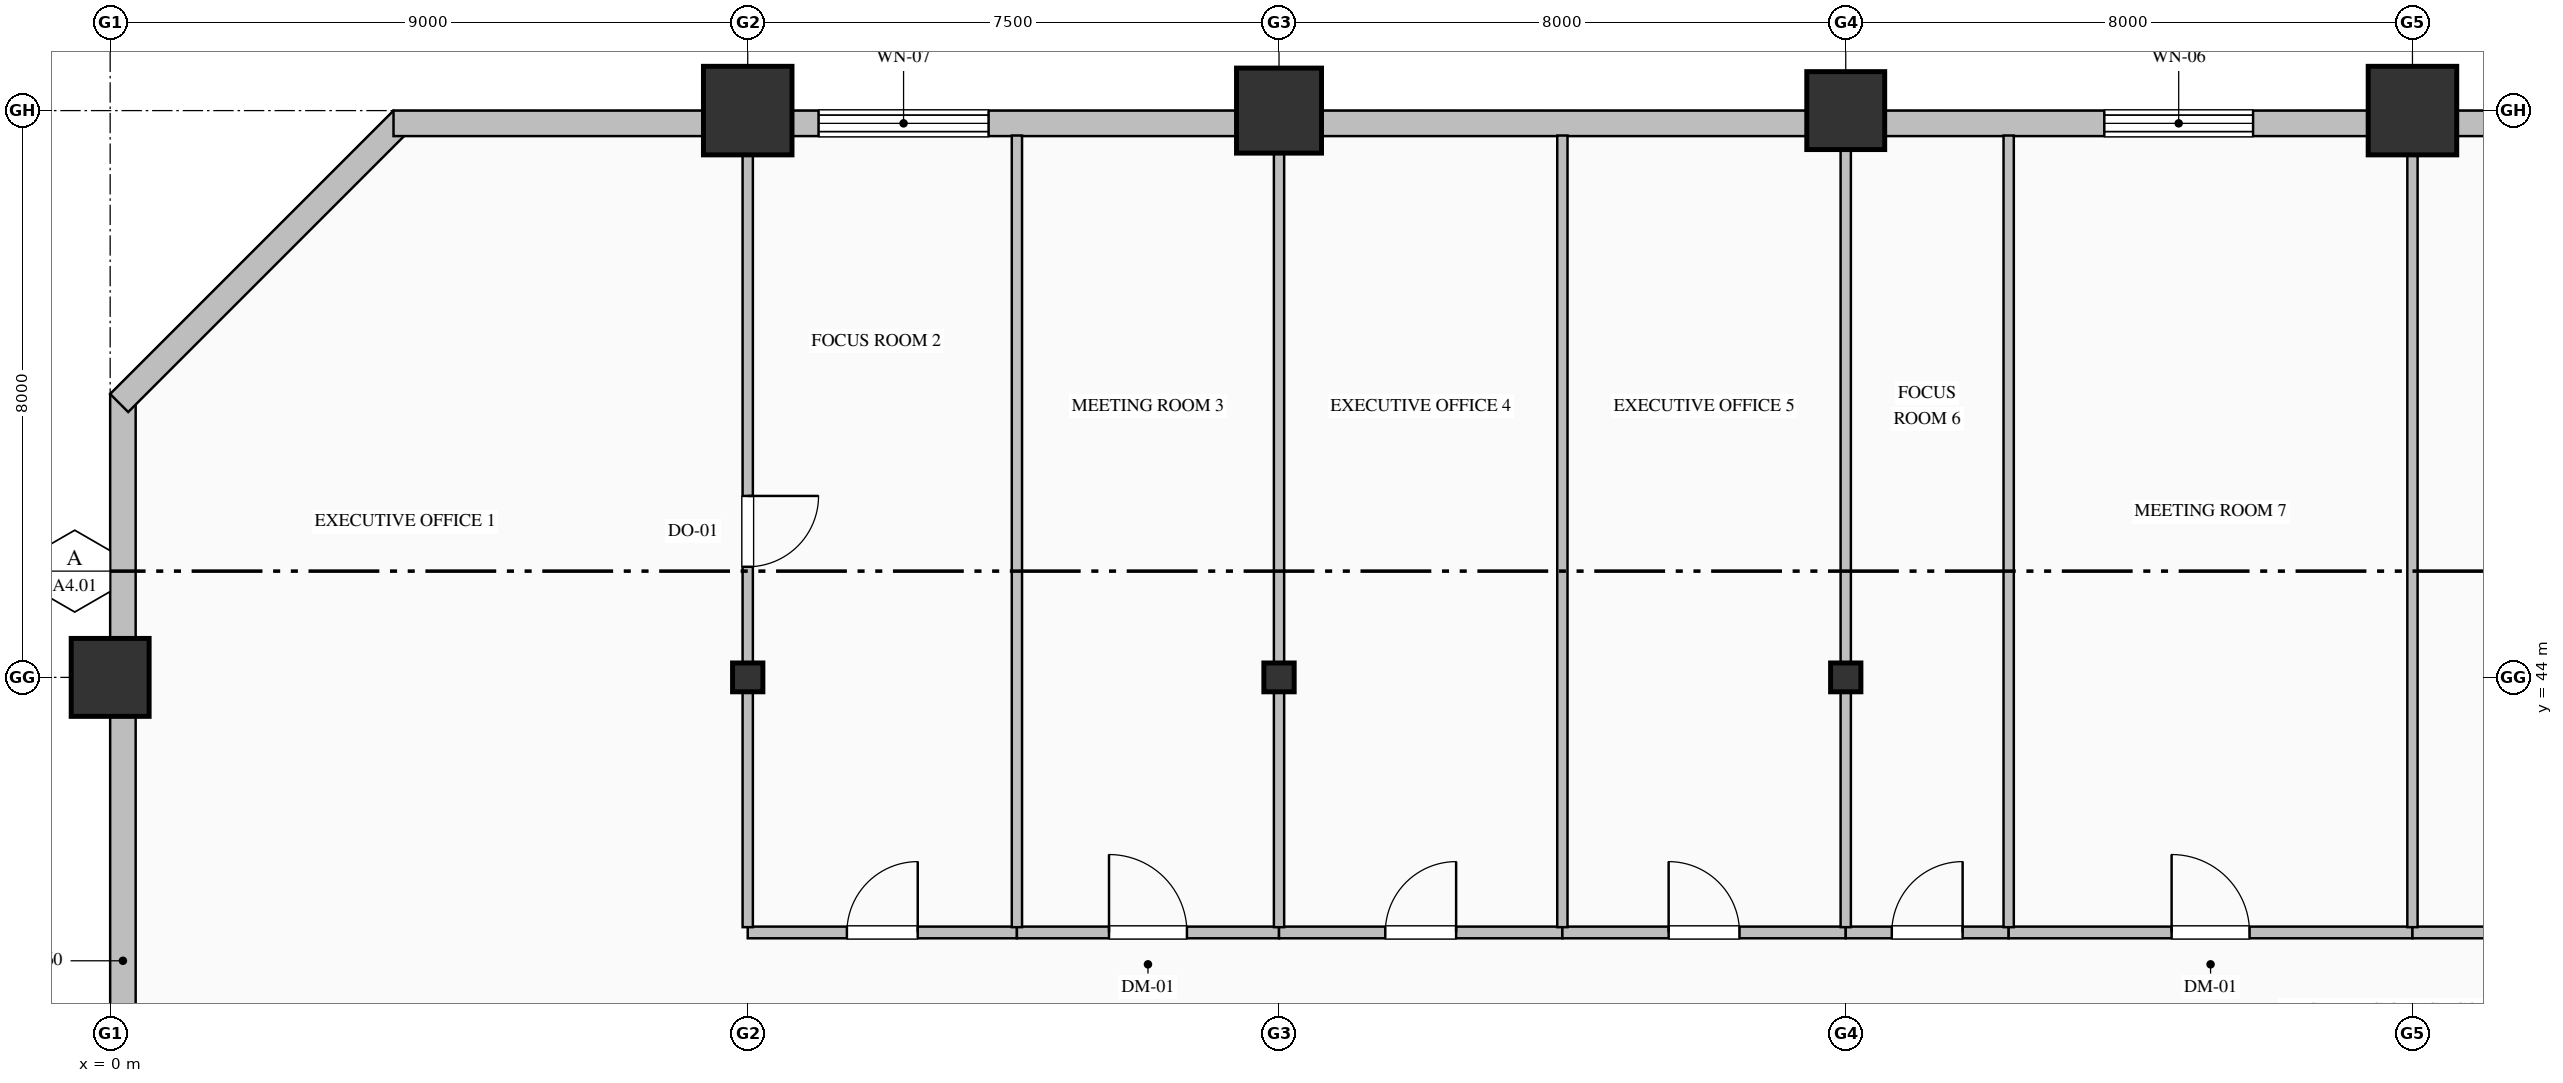
"""IFC4 building model, lengths in metres.
Left out: names, types, materials, properties, quantities, classifications, styles, units other than length and angle.
Written with IfcOpenShell. Run it as: python <this file> out.ifc"""

import sys

from ifc_helpers import new_model, si_unit, direction, frame, frame_2d, origin, origin_2d, place, context, subcontext, project, spatial, rectangle, hollow_rectangle, hollow_circle, i_section, extrude, element, fill, save


model = new_model("IFC4")
c1 = context("Model", 3, precision=1e-05, world=origin(), true_north=direction((0.0, 1.0)))
c2 = subcontext(c1, "Body", "Model", "MODEL_VIEW")
j1 = project(units=[si_unit("LENGTHUNIT", "METRE"), si_unit("PLANEANGLEUNIT", "RADIAN")], contexts=[c1])
p1 = place(None, origin())
s1 = spatial("IfcSite", under=j1, at=p1, CompositionType="ELEMENT")
p2 = place(p1, origin())
s2 = spatial("IfcBuilding", under=s1, at=p2, CompositionType="ELEMENT")
p3 = place(p2, frame((0.0, 0.0, 36.2)))
s3 = spatial("IfcBuildingStorey", under=s2, at=p3, CompositionType="ELEMENT", Elevation=36.2)
p4 = place(p3, frame((0.0, 44.0, 0.0), z_axis=(0.0, 0.0, 1.0), x_axis=(1.0, 0.0, 0.0)))
e1 = element("IfcColumn", 1, at=p4, inside=s3, PredefinedType="COLUMN", context=c2, shape_type="SweptSolid", body=[
    extrude(hollow_rectangle(XDim=1.1, YDim=1.1, WallThickness=0.04, at=origin_2d()), origin(), (0.0, 0.0, 1.0), 4.0),
])
p5 = place(p3, frame((9.0, 44.0, 0.0), z_axis=(0.0, 0.0, 1.0), x_axis=(1.0, 0.0, 0.0)))
e2 = element("IfcColumn", 2, at=p5, inside=s3, PredefinedType="COLUMN", context=c2, shape_type="SweptSolid", body=[
    extrude(i_section(OverallWidth=0.407, OverallDepth=0.428, WebThickness=0.02, FlangeThickness=0.035, FilletRadius=0.022, at=origin_2d()), origin(), (0.0, 0.0, 1.0), 4.0),
])
p6 = place(p3, frame((9.0, 52.0, 0.0), z_axis=(0.0, 0.0, 1.0), x_axis=(1.0, 0.0, 0.0)))
e3 = element("IfcColumn", 3, at=p6, inside=s3, PredefinedType="COLUMN", context=c2, shape_type="SweptSolid", body=[
    extrude(hollow_rectangle(XDim=1.25, YDim=1.25, WallThickness=0.045, at=origin_2d()), origin(), (0.0, 0.0, 1.0), 4.0),
])
p7 = place(p3, frame((16.5, 44.0, 0.0), z_axis=(0.0, 0.0, 1.0), x_axis=(1.0, 0.0, 0.0)))
e4 = element("IfcColumn", 4, at=p7, inside=s3, PredefinedType="COLUMN", context=c2, shape_type="SweptSolid", body=[
    extrude(i_section(OverallWidth=0.407, OverallDepth=0.428, WebThickness=0.02, FlangeThickness=0.035, FilletRadius=0.022, at=origin_2d()), origin(), (0.0, 0.0, 1.0), 4.0),
])
p8 = place(p3, frame((16.5, 52.0, 0.0), z_axis=(0.0, 0.0, 1.0), x_axis=(1.0, 0.0, 0.0)))
e5 = element("IfcColumn", 5, at=p8, inside=s3, PredefinedType="COLUMN", context=c2, shape_type="SweptSolid", body=[
    extrude(hollow_circle(Radius=0.6, WallThickness=0.04, at=origin_2d()), origin(), (0.0, 0.0, 1.0), 4.0),
])
p9 = place(p3, frame((24.5, 44.0, 0.0), z_axis=(0.0, 0.0, 1.0), x_axis=(1.0, 0.0, 0.0)))
e6 = element("IfcColumn", 6, at=p9, inside=s3, PredefinedType="COLUMN", context=c2, shape_type="SweptSolid", body=[
    extrude(i_section(OverallWidth=0.407, OverallDepth=0.428, WebThickness=0.02, FlangeThickness=0.035, FilletRadius=0.022, at=origin_2d()), origin(), (0.0, 0.0, 1.0), 4.0),
])
p10 = place(p3, frame((24.5, 52.0, 0.0), z_axis=(0.0, 0.0, 1.0), x_axis=(1.0, 0.0, 0.0)))
e7 = element("IfcColumn", 7, at=p10, inside=s3, PredefinedType="COLUMN", context=c2, shape_type="SweptSolid", body=[
    extrude(hollow_rectangle(XDim=1.1, YDim=1.1, WallThickness=0.04, at=origin_2d()), origin(), (0.0, 0.0, 1.0), 4.0),
])
p11 = place(p3, frame((32.5, 52.0, 0.0), z_axis=(0.0, 0.0, 1.0), x_axis=(1.0, 0.0, 0.0)))
e8 = element("IfcColumn", 8, at=p11, inside=s3, PredefinedType="COLUMN", context=c2, shape_type="SweptSolid", body=[
    extrude(hollow_rectangle(XDim=1.25, YDim=1.25, WallThickness=0.045, at=origin_2d()), origin(), (0.0, 0.0, 1.0), 4.0),
])
p12 = place(p3, frame((0.18, 32.0, 0.0), z_axis=(0.0, 0.0, 1.0), x_axis=(0.0, 1.0, 0.0)))
e9 = element("IfcWall", 9, at=p12, inside=s3, PredefinedType="SOLIDWALL", context=c2, shape_type="SweptSolid", body=[
    extrude(rectangle(XDim=16.0, YDim=0.36, at=frame_2d((8.0, 0.0))), origin(), (0.0, 0.0, 1.0), 3.25),
])
p13 = place(p3, frame((0.127, 47.873, 0.0), z_axis=(0.0, 0.0, 1.0), x_axis=(0.707106781187, 0.707106781187, 0.0)))
e10 = element("IfcWall", 10, at=p13, inside=s3, PredefinedType="SOLIDWALL", context=c2, shape_type="SweptSolid", body=[
    extrude(rectangle(XDim=5.657, YDim=0.36, at=frame_2d((2.828, 0.0))), origin(), (0.0, 0.0, 1.0), 3.75),
])
p14 = place(p3, frame((4.0, 51.82, 0.0), z_axis=(0.0, 0.0, 1.0), x_axis=(1.0, 0.0, 0.0)))
e11 = element("IfcWall", 11, at=p14, inside=s3, PredefinedType="SOLIDWALL", context=c2, shape_type="SweptSolid", body=[
    extrude(rectangle(XDim=36.52, YDim=0.36, at=frame_2d((18.26, 0.0))), origin(), (0.0, 0.0, 1.0), 3.25),
])
p15 = place(p14, frame((6.0, 0.0, 0.8)))
e12 = element("IfcOpeningElement", 12, at=p15, cuts=e11, PredefinedType="OPENING", context=c2, shape_type="SweptSolid", body=[
    extrude(rectangle(XDim=2.4, YDim=2.15, at=frame_2d((1.2, 1.075))), frame((0.0, 0.19, 0.0), z_axis=(0.0, -1.0, 0.0), x_axis=(1.0, 0.0, 0.0)), (0.0, 0.0, 1.0), 0.38),
])
p16 = place(p14, frame((24.15, 0.0, 0.85)))
e13 = element("IfcOpeningElement", 13, at=p16, cuts=e11, PredefinedType="OPENING", context=c2, shape_type="SweptSolid", body=[
    extrude(rectangle(XDim=2.1, YDim=2.05, at=frame_2d((1.05, 1.025))), frame((0.0, 0.19, 0.0), z_axis=(0.0, -1.0, 0.0), x_axis=(1.0, 0.0, 0.0)), (0.0, 0.0, 1.0), 0.38),
])
p17 = place(p3, frame((9.0, 40.4, 0.0), z_axis=(0.0, 0.0, 1.0), x_axis=(1.0, 0.0, 0.0)))
e14 = element("IfcWall", 14, at=p17, inside=s3, PredefinedType="PARTITIONING", context=c2, shape_type="SweptSolid", body=[
    extrude(rectangle(XDim=3.8, YDim=0.165, at=frame_2d((1.9, 0.0))), origin(), (0.0, 0.0, 1.0), 3.75),
])
p18 = place(p17, frame((1.4, 0.0, 0.0)))
e15 = element("IfcOpeningElement", 15, at=p18, cuts=e14, PredefinedType="OPENING", context=c2, shape_type="SweptSolid", body=[
    extrude(rectangle(XDim=1.0, YDim=2.15, at=frame_2d((0.5, 1.075))), frame((0.0, 0.093, 0.0), z_axis=(0.0, -1.0, 0.0), x_axis=(1.0, 0.0, 0.0)), (0.0, 0.0, 1.0), 0.185),
])
p19 = place(p3, frame((12.8, 40.4, 0.0), z_axis=(0.0, 0.0, 1.0), x_axis=(1.0, 0.0, 0.0)))
e16 = element("IfcWall", 16, at=p19, inside=s3, PredefinedType="PARTITIONING", context=c2, shape_type="SweptSolid", body=[
    extrude(rectangle(XDim=3.7, YDim=0.165, at=frame_2d((1.85, 0.0))), origin(), (0.0, 0.0, 1.0), 3.75),
])
p20 = place(p19, frame((1.3, 0.0, 0.0)))
e17 = element("IfcOpeningElement", 17, at=p20, cuts=e16, PredefinedType="OPENING", context=c2, shape_type="SweptSolid", body=[
    extrude(rectangle(XDim=1.1, YDim=2.2, at=frame_2d((0.55, 1.1))), frame((0.0, 0.093, 0.0), z_axis=(0.0, -1.0, 0.0), x_axis=(1.0, 0.0, 0.0)), (0.0, 0.0, 1.0), 0.185),
])
p21 = place(p3, frame((16.5, 40.4, 0.0), z_axis=(0.0, 0.0, 1.0), x_axis=(1.0, 0.0, 0.0)))
e18 = element("IfcWall", 18, at=p21, inside=s3, PredefinedType="PARTITIONING", context=c2, shape_type="SweptSolid", body=[
    extrude(rectangle(XDim=4.0, YDim=0.165, at=frame_2d((2.0, 0.0))), origin(), (0.0, 0.0, 1.0), 3.75),
])
p22 = place(p21, frame((1.5, 0.0, 0.0)))
e19 = element("IfcOpeningElement", 19, at=p22, cuts=e18, PredefinedType="OPENING", context=c2, shape_type="SweptSolid", body=[
    extrude(rectangle(XDim=1.0, YDim=2.15, at=frame_2d((0.5, 1.075))), frame((0.0, 0.093, 0.0), z_axis=(0.0, -1.0, 0.0), x_axis=(1.0, 0.0, 0.0)), (0.0, 0.0, 1.0), 0.185),
])
p23 = place(p3, frame((20.5, 40.4, 0.0), z_axis=(0.0, 0.0, 1.0), x_axis=(1.0, 0.0, 0.0)))
e20 = element("IfcWall", 20, at=p23, inside=s3, PredefinedType="PARTITIONING", context=c2, shape_type="SweptSolid", body=[
    extrude(rectangle(XDim=4.0, YDim=0.165, at=frame_2d((2.0, 0.0))), origin(), (0.0, 0.0, 1.0), 3.75),
])
p24 = place(p23, frame((1.5, 0.0, 0.0)))
e21 = element("IfcOpeningElement", 21, at=p24, cuts=e20, PredefinedType="OPENING", context=c2, shape_type="SweptSolid", body=[
    extrude(rectangle(XDim=1.0, YDim=2.15, at=frame_2d((0.5, 1.075))), frame((0.0, 0.093, 0.0), z_axis=(0.0, -1.0, 0.0), x_axis=(1.0, 0.0, 0.0)), (0.0, 0.0, 1.0), 0.185),
])
p25 = place(p3, frame((24.5, 40.4, 0.0), z_axis=(0.0, 0.0, 1.0), x_axis=(1.0, 0.0, 0.0)))
e22 = element("IfcWall", 22, at=p25, inside=s3, PredefinedType="PARTITIONING", context=c2, shape_type="SweptSolid", body=[
    extrude(rectangle(XDim=2.3, YDim=0.165, at=frame_2d((1.15, 0.0))), origin(), (0.0, 0.0, 1.0), 3.75),
])
p26 = place(p25, frame((0.65, 0.0, 0.0)))
e23 = element("IfcOpeningElement", 23, at=p26, cuts=e22, PredefinedType="OPENING", context=c2, shape_type="SweptSolid", body=[
    extrude(rectangle(XDim=1.0, YDim=2.15, at=frame_2d((0.5, 1.075))), frame((0.0, 0.093, 0.0), z_axis=(0.0, -1.0, 0.0), x_axis=(1.0, 0.0, 0.0)), (0.0, 0.0, 1.0), 0.185),
])
p27 = place(p3, frame((26.8, 40.4, 0.0), z_axis=(0.0, 0.0, 1.0), x_axis=(1.0, 0.0, 0.0)))
e24 = element("IfcWall", 24, at=p27, inside=s3, PredefinedType="PARTITIONING", context=c2, shape_type="SweptSolid", body=[
    extrude(rectangle(XDim=5.7, YDim=0.165, at=frame_2d((2.85, 0.0))), origin(), (0.0, 0.0, 1.0), 3.75),
])
p28 = place(p27, frame((2.3, 0.0, 0.0)))
e25 = element("IfcOpeningElement", 25, at=p28, cuts=e24, PredefinedType="OPENING", context=c2, shape_type="SweptSolid", body=[
    extrude(rectangle(XDim=1.1, YDim=2.2, at=frame_2d((0.55, 1.1))), frame((0.0, 0.093, 0.0), z_axis=(0.0, -1.0, 0.0), x_axis=(1.0, 0.0, 0.0)), (0.0, 0.0, 1.0), 0.185),
])
p29 = place(p3, frame((32.5, 40.4, 0.0), z_axis=(0.0, 0.0, 1.0), x_axis=(1.0, 0.0, 0.0)))
e26 = element("IfcWall", 26, at=p29, inside=s3, PredefinedType="PARTITIONING", context=c2, shape_type="SweptSolid", body=[
    extrude(rectangle(XDim=5.3, YDim=0.165, at=frame_2d((2.65, 0.0))), origin(), (0.0, 0.0, 1.0), 3.75),
])
p30 = place(p29, frame((2.15, 0.0, 0.0)))
e27 = element("IfcOpeningElement", 27, at=p30, cuts=e26, PredefinedType="OPENING", context=c2, shape_type="SweptSolid", body=[
    extrude(rectangle(XDim=1.0, YDim=2.15, at=frame_2d((0.5, 1.075))), frame((0.0, 0.093, 0.0), z_axis=(0.0, -1.0, 0.0), x_axis=(1.0, 0.0, 0.0)), (0.0, 0.0, 1.0), 0.185),
])
p31 = place(p3, frame((9.0, 51.648, 0.0), z_axis=(0.0, 0.0, 1.0), x_axis=(0.0, -1.0, 0.0)))
e28 = element("IfcWall", 28, at=p31, inside=s3, PredefinedType="PARTITIONING", context=c2, shape_type="SweptSolid", body=[
    extrude(rectangle(XDim=11.173, YDim=0.145, at=frame_2d((5.587, 0.0))), origin(), (0.0, 0.0, 1.0), 3.042),
])
p32 = place(p31, frame((5.087, 0.0, 0.0)))
e29 = element("IfcOpeningElement", 29, at=p32, cuts=e28, PredefinedType="OPENING", context=c2, shape_type="SweptSolid", body=[
    extrude(rectangle(XDim=1.0, YDim=2.15, at=frame_2d((0.5, 1.075))), frame((0.0, 0.083, 0.0), z_axis=(0.0, -1.0, 0.0), x_axis=(1.0, 0.0, 0.0)), (0.0, 0.0, 1.0), 0.165),
])
p33 = place(p3, frame((12.8, 51.648, 0.0), z_axis=(0.0, 0.0, 1.0), x_axis=(0.0, -1.0, 0.0)))
e30 = element("IfcWall", 30, at=p33, inside=s3, PredefinedType="PARTITIONING", context=c2, shape_type="SweptSolid", body=[
    extrude(rectangle(XDim=11.173, YDim=0.145, at=frame_2d((5.587, 0.0))), origin(), (0.0, 0.0, 1.0), 3.75),
])
p34 = place(p3, frame((16.5, 51.648, 0.0), z_axis=(0.0, 0.0, 1.0), x_axis=(0.0, -1.0, 0.0)))
e31 = element("IfcWall", 31, at=p34, inside=s3, PredefinedType="PARTITIONING", context=c2, shape_type="SweptSolid", body=[
    extrude(rectangle(XDim=11.173, YDim=0.145, at=frame_2d((5.587, 0.0))), origin(), (0.0, 0.0, 1.0), 3.042),
])
p35 = place(p3, frame((20.5, 51.648, 0.0), z_axis=(0.0, 0.0, 1.0), x_axis=(0.0, -1.0, 0.0)))
e32 = element("IfcWall", 32, at=p35, inside=s3, PredefinedType="PARTITIONING", context=c2, shape_type="SweptSolid", body=[
    extrude(rectangle(XDim=11.173, YDim=0.145, at=frame_2d((5.587, 0.0))), origin(), (0.0, 0.0, 1.0), 3.75),
])
p36 = place(p3, frame((24.5, 51.648, 0.0), z_axis=(0.0, 0.0, 1.0), x_axis=(0.0, -1.0, 0.0)))
e33 = element("IfcWall", 33, at=p36, inside=s3, PredefinedType="PARTITIONING", context=c2, shape_type="SweptSolid", body=[
    extrude(rectangle(XDim=11.173, YDim=0.145, at=frame_2d((5.587, 0.0))), origin(), (0.0, 0.0, 1.0), 3.042),
])
for number, where, z_axis, x_axis in (
    (34, (26.8, 51.648, 0.0), (0.0, 0.0, 1.0), (0.0, -1.0, 0.0)),
    (35, (32.5, 51.648, 0.0), (0.0, 0.0, 1.0), (0.0, -1.0, 0.0)),
):
    element("IfcWall", number, at=place(p3, frame(where, z_axis=z_axis, x_axis=x_axis)), inside=s3, PredefinedType="PARTITIONING", context=c2, shape_type="SweptSolid", body=[
        extrude(rectangle(XDim=11.173, YDim=0.145, at=frame_2d((5.587, 0.0))), origin(), (0.0, 0.0, 1.0), 3.75),
    ])
p37 = place(p15, origin())
e36 = element("IfcWindow", 36, at=p37, inside=s3, PartitioningType="TRIPLE_PANEL_VERTICAL", PredefinedType="WINDOW", context=c2, shape_type="SweptSolid", body=[
    extrude(rectangle(XDim=2.4, YDim=2.15, at=frame_2d((1.2, 1.075))), frame((0.0, 0.15, 0.0), z_axis=(0.0, -1.0, 0.0), x_axis=(1.0, 0.0, 0.0)), (0.0, 0.0, 1.0), 0.06),
])
fill(e12, e36)
p38 = place(p16, origin())
e37 = element("IfcWindow", 37, at=p38, inside=s3, PartitioningType="TRIPLE_PANEL_VERTICAL", PredefinedType="WINDOW", context=c2, shape_type="SweptSolid", body=[
    extrude(rectangle(XDim=2.1, YDim=2.05, at=frame_2d((1.05, 1.025))), frame((0.0, 0.15, 0.0), z_axis=(0.0, -1.0, 0.0), x_axis=(1.0, 0.0, 0.0)), (0.0, 0.0, 1.0), 0.06),
])
fill(e13, e37)
p39 = place(p32, origin())
e38 = element("IfcDoor", 38, at=p39, inside=s3, OperationType="SINGLE_SWING_LEFT", PredefinedType="DOOR", context=c2, shape_type="SweptSolid", body=[
    extrude(rectangle(XDim=1.0, YDim=2.15, at=frame_2d((0.5, 1.075))), frame((0.0, 0.025, 0.0), z_axis=(0.0, -1.0, 0.0), x_axis=(1.0, 0.0, 0.0)), (0.0, 0.0, 1.0), 0.05),
])
fill(e29, e38)
p40 = place(p18, origin())
e39 = element("IfcDoor", 39, at=p40, inside=s3, OperationType="SINGLE_SWING_RIGHT", PredefinedType="DOOR", context=c2, shape_type="SweptSolid", body=[
    extrude(rectangle(XDim=1.0, YDim=2.15, at=frame_2d((0.5, 1.075))), frame((0.0, 0.025, 0.0), z_axis=(0.0, -1.0, 0.0), x_axis=(1.0, 0.0, 0.0)), (0.0, 0.0, 1.0), 0.05),
])
fill(e15, e39)
p41 = place(p20, origin())
e40 = element("IfcDoor", 40, at=p41, inside=s3, OperationType="SINGLE_SWING_LEFT", PredefinedType="DOOR", context=c2, shape_type="SweptSolid", body=[
    extrude(rectangle(XDim=1.1, YDim=2.2, at=frame_2d((0.55, 1.1))), frame((0.0, 0.025, 0.0), z_axis=(0.0, -1.0, 0.0), x_axis=(1.0, 0.0, 0.0)), (0.0, 0.0, 1.0), 0.05),
])
fill(e17, e40)
p42 = place(p22, origin())
e41 = element("IfcDoor", 41, at=p42, inside=s3, OperationType="SINGLE_SWING_RIGHT", PredefinedType="DOOR", context=c2, shape_type="SweptSolid", body=[
    extrude(rectangle(XDim=1.0, YDim=2.15, at=frame_2d((0.5, 1.075))), frame((0.0, 0.025, 0.0), z_axis=(0.0, -1.0, 0.0), x_axis=(1.0, 0.0, 0.0)), (0.0, 0.0, 1.0), 0.05),
])
fill(e19, e41)
p43 = place(p24, origin())
e42 = element("IfcDoor", 42, at=p43, inside=s3, OperationType="SINGLE_SWING_LEFT", PredefinedType="DOOR", context=c2, shape_type="SweptSolid", body=[
    extrude(rectangle(XDim=1.0, YDim=2.15, at=frame_2d((0.5, 1.075))), frame((0.0, 0.025, 0.0), z_axis=(0.0, -1.0, 0.0), x_axis=(1.0, 0.0, 0.0)), (0.0, 0.0, 1.0), 0.05),
])
fill(e21, e42)
p44 = place(p26, origin())
e43 = element("IfcDoor", 43, at=p44, inside=s3, OperationType="SINGLE_SWING_RIGHT", PredefinedType="DOOR", context=c2, shape_type="SweptSolid", body=[
    extrude(rectangle(XDim=1.0, YDim=2.15, at=frame_2d((0.5, 1.075))), frame((0.0, 0.025, 0.0), z_axis=(0.0, -1.0, 0.0), x_axis=(1.0, 0.0, 0.0)), (0.0, 0.0, 1.0), 0.05),
])
fill(e23, e43)
p45 = place(p28, origin())
e44 = element("IfcDoor", 44, at=p45, inside=s3, OperationType="SINGLE_SWING_LEFT", PredefinedType="DOOR", context=c2, shape_type="SweptSolid", body=[
    extrude(rectangle(XDim=1.1, YDim=2.2, at=frame_2d((0.55, 1.1))), frame((0.0, 0.025, 0.0), z_axis=(0.0, -1.0, 0.0), x_axis=(1.0, 0.0, 0.0)), (0.0, 0.0, 1.0), 0.05),
])
fill(e25, e44)
save(model, sys.argv[1])
